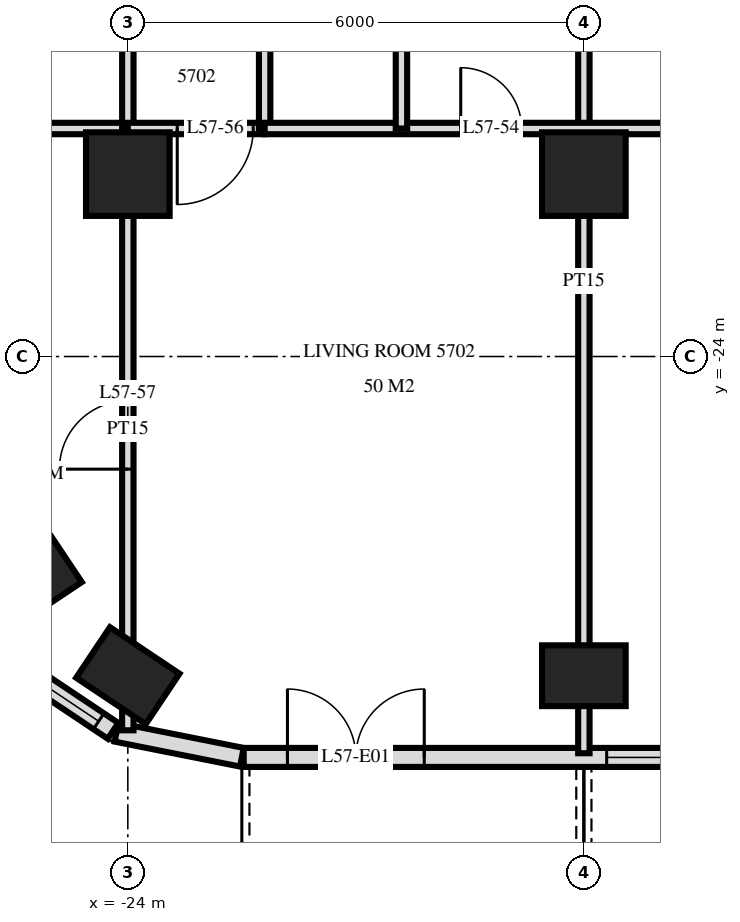
"""IFC4 building model, lengths in metres.
Left out: names, types, materials, properties, quantities, classifications, styles, units other than length and angle.
Written with IfcOpenShell. Run it as: python <this file> out.ifc"""

import sys

from ifc_helpers import new_model, si_unit, direction, frame, frame_2d, origin, origin_2d, place, context, subcontext, project, spatial, rectangle, extrude, element, fill, save


model = new_model("IFC4")
c1 = context("Model", 3, precision=1e-05, world=origin(), true_north=direction((0.0, 1.0)))
c2 = subcontext(c1, "Body", "Model", "MODEL_VIEW")
j1 = project(units=[si_unit("LENGTHUNIT", "METRE"), si_unit("PLANEANGLEUNIT", "RADIAN")], contexts=[c1])
p1 = place(None, origin())
s1 = spatial("IfcSite", under=j1, at=p1, CompositionType="ELEMENT")
p2 = place(p1, origin())
s2 = spatial("IfcBuilding", under=s1, at=p2, CompositionType="ELEMENT")
p3 = place(p2, frame((0.0, 0.0, 218.6)))
s3 = spatial("IfcBuildingStorey", under=s2, at=p3, CompositionType="ELEMENT", Elevation=218.6)
for number, where, z_axis, x_axis in (
    (1, (-25.244, -26.733, 0.0), (0.0, 0.0, 1.0), (-0.556, 0.831, 0.0)),
    (2, (-24.0, -28.2, 0.0), (0.0, 0.0, 1.0), (-0.831, 0.556, 0.0)),
):
    element("IfcColumn", number, at=place(p3, frame(where, z_axis=z_axis, x_axis=x_axis)), inside=s3, PredefinedType="COLUMN", context=c2, shape_type="SweptSolid", body=[
        extrude(rectangle(XDim=1.1, YDim=0.8, at=origin_2d()), origin(), (0.0, 0.0, 1.0), 3.5),
    ])
p4 = place(p3, frame((-24.0, -21.6, 0.0), z_axis=(0.0, 0.0, 1.0), x_axis=(1.0, 0.0, 0.0)))
e3 = element("IfcColumn", 3, at=p4, inside=s3, PredefinedType="COLUMN", context=c2, shape_type="SweptSolid", body=[
    extrude(rectangle(XDim=1.1, YDim=1.1, at=origin_2d()), origin(), (0.0, 0.0, 1.0), 3.5),
])
p5 = place(p3, frame((-18.0, -28.2, 0.0), z_axis=(0.0, 0.0, 1.0), x_axis=(1.0, 0.0, 0.0)))
e4 = element("IfcColumn", 4, at=p5, inside=s3, PredefinedType="COLUMN", context=c2, shape_type="SweptSolid", body=[
    extrude(rectangle(XDim=1.1, YDim=0.8, at=origin_2d()), origin(), (0.0, 0.0, 1.0), 3.5),
])
p6 = place(p3, frame((-18.0, -21.6, 0.0), z_axis=(0.0, 0.0, 1.0), x_axis=(1.0, 0.0, 0.0)))
e5 = element("IfcColumn", 5, at=p6, inside=s3, PredefinedType="COLUMN", context=c2, shape_type="SweptSolid", body=[
    extrude(rectangle(XDim=1.1, YDim=1.1, at=origin_2d()), origin(), (0.0, 0.0, 1.0), 3.5),
])
p7 = place(p3, frame((-25.571, -28.006, 0.0), z_axis=(0.0, 0.0, 1.0), x_axis=(0.831482937015, -0.55555029066, 0.0)))
e6 = element("IfcWall", 6, at=p7, inside=s3, PredefinedType="SOLIDWALL", context=c2, shape_type="SweptSolid", body=[
    extrude(rectangle(XDim=1.656, YDim=0.25, at=frame_2d((0.828, 0.0))), origin(), (0.0, 0.0, 1.0), 3.22),
])
p8 = place(p7, frame((0.228, 0.0, 0.9)))
e7 = element("IfcOpeningElement", 7, at=p8, cuts=e6, PredefinedType="OPENING", context=c2, shape_type="SweptSolid", body=[
    extrude(rectangle(XDim=1.2, YDim=1.5, at=frame_2d((0.6, 0.75))), frame((0.0, 0.135, 0.0), z_axis=(0.0, -1.0, 0.0), x_axis=(1.0, 0.0, 0.0)), (0.0, 0.0, 1.0), 0.27),
])
p9 = place(p3, frame((-24.149, -28.945, 0.0), z_axis=(0.0, 0.0, 1.0), x_axis=(0.980775640221, -0.19513878023, 0.0)))
e8 = element("IfcWall", 8, at=p9, inside=s3, PredefinedType="SOLIDWALL", context=c2, shape_type="SweptSolid", body=[
    extrude(rectangle(XDim=1.681, YDim=0.25, at=frame_2d((0.841, 0.0))), origin(), (0.0, 0.0, 1.0), 3.22),
])
p10 = place(p3, frame((-22.475, -29.275, 0.0), z_axis=(0.0, 0.0, 1.0), x_axis=(1.0, 0.0, 0.0)))
e9 = element("IfcWall", 9, at=p10, inside=s3, PredefinedType="SOLIDWALL", context=c2, shape_type="SweptSolid", body=[
    extrude(rectangle(XDim=44.951, YDim=0.25, at=frame_2d((22.475, 0.0))), origin(), (0.0, 0.0, 1.0), 3.22),
])
p11 = place(p10, frame((0.575, 0.0, 0.0)))
e10 = element("IfcOpeningElement", 10, at=p11, cuts=e9, PredefinedType="OPENING", context=c2, shape_type="SweptSolid", body=[
    extrude(rectangle(XDim=1.8, YDim=2.4, at=frame_2d((0.9, 1.2))), frame((0.0, 0.135, 0.0), z_axis=(0.0, -1.0, 0.0), x_axis=(1.0, 0.0, 0.0)), (0.0, 0.0, 1.0), 0.27),
])
p12 = place(p10, frame((4.775, 0.0, 0.9)))
e11 = element("IfcOpeningElement", 11, at=p12, cuts=e9, PredefinedType="OPENING", context=c2, shape_type="SweptSolid", body=[
    extrude(rectangle(XDim=2.4, YDim=1.5, at=frame_2d((1.2, 0.75))), frame((0.0, 0.135, 0.0), z_axis=(0.0, -1.0, 0.0), x_axis=(1.0, 0.0, 0.0)), (0.0, 0.0, 1.0), 0.27),
])
p13 = place(p10, frame((8.075, 0.0, 0.0)))
e12 = element("IfcOpeningElement", 12, at=p13, cuts=e9, PredefinedType="OPENING", context=c2, shape_type="SweptSolid", body=[
    extrude(rectangle(XDim=1.8, YDim=2.4, at=frame_2d((0.9, 1.2))), frame((0.0, 0.135, 0.0), z_axis=(0.0, -1.0, 0.0), x_axis=(1.0, 0.0, 0.0)), (0.0, 0.0, 1.0), 0.27),
])
p14 = place(p10, frame((11.075, 0.0, 0.0)))
e13 = element("IfcOpeningElement", 13, at=p14, cuts=e9, PredefinedType="OPENING", context=c2, shape_type="SweptSolid", body=[
    extrude(rectangle(XDim=1.8, YDim=2.4, at=frame_2d((0.9, 1.2))), frame((0.0, 0.135, 0.0), z_axis=(0.0, -1.0, 0.0), x_axis=(1.0, 0.0, 0.0)), (0.0, 0.0, 1.0), 0.27),
])
p15 = place(p10, frame((13.775, 0.0, 0.9)))
e14 = element("IfcOpeningElement", 14, at=p15, cuts=e9, PredefinedType="OPENING", context=c2, shape_type="SweptSolid", body=[
    extrude(rectangle(XDim=2.4, YDim=1.5, at=frame_2d((1.2, 0.75))), frame((0.0, 0.135, 0.0), z_axis=(0.0, -1.0, 0.0), x_axis=(1.0, 0.0, 0.0)), (0.0, 0.0, 1.0), 0.27),
])
p16 = place(p10, frame((16.775, 0.0, 0.9)))
e15 = element("IfcOpeningElement", 15, at=p16, cuts=e9, PredefinedType="OPENING", context=c2, shape_type="SweptSolid", body=[
    extrude(rectangle(XDim=2.4, YDim=1.5, at=frame_2d((1.2, 0.75))), frame((0.0, 0.135, 0.0), z_axis=(0.0, -1.0, 0.0), x_axis=(1.0, 0.0, 0.0)), (0.0, 0.0, 1.0), 0.27),
])
p17 = place(p10, frame((20.075, 0.0, 0.0)))
e16 = element("IfcOpeningElement", 16, at=p17, cuts=e9, PredefinedType="OPENING", context=c2, shape_type="SweptSolid", body=[
    extrude(rectangle(XDim=1.8, YDim=2.4, at=frame_2d((0.9, 1.2))), frame((0.0, 0.135, 0.0), z_axis=(0.0, -1.0, 0.0), x_axis=(1.0, 0.0, 0.0)), (0.0, 0.0, 1.0), 0.27),
])
p18 = place(p10, frame((23.075, 0.0, 0.0)))
e17 = element("IfcOpeningElement", 17, at=p18, cuts=e9, PredefinedType="OPENING", context=c2, shape_type="SweptSolid", body=[
    extrude(rectangle(XDim=1.8, YDim=2.4, at=frame_2d((0.9, 1.2))), frame((0.0, 0.135, 0.0), z_axis=(0.0, -1.0, 0.0), x_axis=(1.0, 0.0, 0.0)), (0.0, 0.0, 1.0), 0.27),
])
p19 = place(p10, frame((25.775, 0.0, 0.9)))
e18 = element("IfcOpeningElement", 18, at=p19, cuts=e9, PredefinedType="OPENING", context=c2, shape_type="SweptSolid", body=[
    extrude(rectangle(XDim=2.4, YDim=1.5, at=frame_2d((1.2, 0.75))), frame((0.0, 0.135, 0.0), z_axis=(0.0, -1.0, 0.0), x_axis=(1.0, 0.0, 0.0)), (0.0, 0.0, 1.0), 0.27),
])
p20 = place(p10, frame((29.075, 0.0, 0.0)))
e19 = element("IfcOpeningElement", 19, at=p20, cuts=e9, PredefinedType="OPENING", context=c2, shape_type="SweptSolid", body=[
    extrude(rectangle(XDim=1.8, YDim=2.4, at=frame_2d((0.9, 1.2))), frame((0.0, 0.135, 0.0), z_axis=(0.0, -1.0, 0.0), x_axis=(1.0, 0.0, 0.0)), (0.0, 0.0, 1.0), 0.27),
])
p21 = place(p10, frame((31.775, 0.0, 0.9)))
e20 = element("IfcOpeningElement", 20, at=p21, cuts=e9, PredefinedType="OPENING", context=c2, shape_type="SweptSolid", body=[
    extrude(rectangle(XDim=2.4, YDim=1.5, at=frame_2d((1.2, 0.75))), frame((0.0, 0.135, 0.0), z_axis=(0.0, -1.0, 0.0), x_axis=(1.0, 0.0, 0.0)), (0.0, 0.0, 1.0), 0.27),
])
p22 = place(p10, frame((35.075, 0.0, 0.0)))
e21 = element("IfcOpeningElement", 21, at=p22, cuts=e9, PredefinedType="OPENING", context=c2, shape_type="SweptSolid", body=[
    extrude(rectangle(XDim=1.8, YDim=2.4, at=frame_2d((0.9, 1.2))), frame((0.0, 0.135, 0.0), z_axis=(0.0, -1.0, 0.0), x_axis=(1.0, 0.0, 0.0)), (0.0, 0.0, 1.0), 0.27),
])
p23 = place(p10, frame((41.075, 0.0, 0.0)))
e22 = element("IfcOpeningElement", 22, at=p23, cuts=e9, PredefinedType="OPENING", context=c2, shape_type="SweptSolid", body=[
    extrude(rectangle(XDim=1.8, YDim=2.4, at=frame_2d((0.9, 1.2))), frame((0.0, 0.135, 0.0), z_axis=(0.0, -1.0, 0.0), x_axis=(1.0, 0.0, 0.0)), (0.0, 0.0, 1.0), 0.27),
])
p24 = place(p3, frame((-18.0, -29.22, 0.0), z_axis=(0.0, 0.0, 1.0), x_axis=(0.0, 1.0, 0.0)))
e23 = element("IfcWall", 23, at=p24, inside=s3, PredefinedType="PARTITIONING", context=c2, shape_type="SweptSolid", body=[
    extrude(rectangle(XDim=12.42, YDim=0.15, at=frame_2d((6.21, 0.0))), origin(), (0.0, 0.0, 1.0), 3.22),
])
for number, where, z_axis, x_axis in (
    (24, (-20.4, -21.0, 0.0), (0.0, 0.0, 1.0), (0.0, 1.0, 0.0)),
    (25, (-22.2, -21.0, 0.0), (0.0, 0.0, 1.0), (0.0, 1.0, 0.0)),
):
    element("IfcWall", number, at=place(p3, frame(where, z_axis=z_axis, x_axis=x_axis)), inside=s3, PredefinedType="PARTITIONING", context=c2, shape_type="SweptSolid", body=[
        extrude(rectangle(XDim=4.2, YDim=0.15, at=frame_2d((2.1, 0.0))), origin(), (0.0, 0.0, 1.0), 3.22),
    ])
p25 = place(p3, frame((-24.0, -21.0, 0.0), z_axis=(0.0, 0.0, 1.0), x_axis=(0.0, 1.0, 0.0)))
e26 = element("IfcWall", 26, at=p25, inside=s3, PredefinedType="PARTITIONING", context=c2, shape_type="SweptSolid", body=[
    extrude(rectangle(XDim=4.2, YDim=0.15, at=frame_2d((2.1, 0.0))), origin(), (0.0, 0.0, 1.0), 3.22),
])
p26 = place(p25, frame((1.58, 0.0, 0.0)))
e27 = element("IfcOpeningElement", 27, at=p26, cuts=e26, PredefinedType="OPENING", context=c2, shape_type="SweptSolid", body=[
    extrude(rectangle(XDim=1.0, YDim=2.1, at=frame_2d((0.5, 1.05))), frame((0.0, 0.085, 0.0), z_axis=(0.0, -1.0, 0.0), x_axis=(1.0, 0.0, 0.0)), (0.0, 0.0, 1.0), 0.17),
])
p27 = place(p3, frame((-24.0, -28.918, 0.0), z_axis=(0.0, 0.0, 1.0), x_axis=(0.0, 1.0, 0.0)))
e28 = element("IfcWall", 28, at=p27, inside=s3, PredefinedType="PARTITIONING", context=c2, shape_type="SweptSolid", body=[
    extrude(rectangle(XDim=7.918, YDim=0.15, at=frame_2d((3.959, 0.0))), origin(), (0.0, 0.0, 1.0), 3.22),
])
p28 = place(p27, frame((3.436, 0.0, 0.0)))
e29 = element("IfcOpeningElement", 29, at=p28, cuts=e28, PredefinedType="OPENING", context=c2, shape_type="SweptSolid", body=[
    extrude(rectangle(XDim=0.9, YDim=2.1, at=frame_2d((0.45, 1.05))), frame((0.0, 0.085, 0.0), z_axis=(0.0, -1.0, 0.0), x_axis=(1.0, 0.0, 0.0)), (0.0, 0.0, 1.0), 0.17),
])
p29 = place(p3, frame((-24.0, -21.0, 0.0), z_axis=(0.0, 0.0, 1.0), x_axis=(1.0, 0.0, 0.0)))
e30 = element("IfcWall", 30, at=p29, inside=s3, PredefinedType="PARTITIONING", context=c2, shape_type="SweptSolid", body=[
    extrude(rectangle(XDim=1.8, YDim=0.15, at=frame_2d((0.9, 0.0))), origin(), (0.0, 0.0, 1.0), 3.22),
])
p30 = place(p29, frame((0.65, 0.0, 0.0)))
e31 = element("IfcOpeningElement", 31, at=p30, cuts=e30, PredefinedType="OPENING", context=c2, shape_type="SweptSolid", body=[
    extrude(rectangle(XDim=1.0, YDim=2.1, at=frame_2d((0.5, 1.05))), frame((0.0, 0.085, 0.0), z_axis=(0.0, -1.0, 0.0), x_axis=(1.0, 0.0, 0.0)), (0.0, 0.0, 1.0), 0.17),
])
p31 = place(p3, frame((-26.82, -21.0, 0.0), z_axis=(0.0, 0.0, 1.0), x_axis=(1.0, 0.0, 0.0)))
e32 = element("IfcWall", 32, at=p31, inside=s3, PredefinedType="PARTITIONING", context=c2, shape_type="SweptSolid", body=[
    extrude(rectangle(XDim=2.82, YDim=0.15, at=frame_2d((1.41, 0.0))), origin(), (0.0, 0.0, 1.0), 3.22),
])
p32 = place(p3, frame((-22.2, -21.0, 0.0), z_axis=(0.0, 0.0, 1.0), x_axis=(1.0, 0.0, 0.0)))
e33 = element("IfcWall", 33, at=p32, inside=s3, PredefinedType="PARTITIONING", context=c2, shape_type="SweptSolid", body=[
    extrude(rectangle(XDim=6.3, YDim=0.15, at=frame_2d((3.15, 0.0))), origin(), (0.0, 0.0, 1.0), 3.22),
])
p33 = place(p32, frame((2.58, 0.0, 0.0)))
e34 = element("IfcOpeningElement", 34, at=p33, cuts=e33, PredefinedType="OPENING", context=c2, shape_type="SweptSolid", body=[
    extrude(rectangle(XDim=0.8, YDim=2.1, at=frame_2d((0.4, 1.05))), frame((0.0, 0.085, 0.0), z_axis=(0.0, -1.0, 0.0), x_axis=(1.0, 0.0, 0.0)), (0.0, 0.0, 1.0), 0.17),
])
p34 = place(p8, origin())
e35 = element("IfcWindow", 35, at=p34, inside=s3, PartitioningType="SINGLE_PANEL", PredefinedType="WINDOW", context=c2, shape_type="SweptSolid", body=[
    extrude(rectangle(XDim=1.2, YDim=1.5, at=frame_2d((0.6, 0.75))), frame((0.0, 0.03, 0.0), z_axis=(0.0, -1.0, 0.0), x_axis=(1.0, 0.0, 0.0)), (0.0, 0.0, 1.0), 0.06),
])
fill(e7, e35)
p35 = place(p11, origin())
e36 = element("IfcDoor", 36, at=p35, inside=s3, OperationType="DOUBLE_DOOR_SINGLE_SWING", PredefinedType="DOOR", context=c2, shape_type="SweptSolid", body=[
    extrude(rectangle(XDim=1.8, YDim=2.4, at=frame_2d((0.9, 1.2))), frame((0.0, 0.025, 0.0), z_axis=(0.0, -1.0, 0.0), x_axis=(1.0, 0.0, 0.0)), (0.0, 0.0, 1.0), 0.05),
])
fill(e10, e36)
p36 = place(p12, origin())
e37 = element("IfcWindow", 37, at=p36, inside=s3, PartitioningType="SINGLE_PANEL", PredefinedType="WINDOW", context=c2, shape_type="SweptSolid", body=[
    extrude(rectangle(XDim=2.4, YDim=1.5, at=frame_2d((1.2, 0.75))), frame((0.0, 0.03, 0.0), z_axis=(0.0, -1.0, 0.0), x_axis=(1.0, 0.0, 0.0)), (0.0, 0.0, 1.0), 0.06),
])
fill(e11, e37)
p37 = place(p33, origin())
e38 = element("IfcDoor", 38, at=p37, inside=s3, OperationType="SINGLE_SWING_RIGHT", PredefinedType="DOOR", context=c2, shape_type="SweptSolid", body=[
    extrude(rectangle(XDim=0.8, YDim=2.1, at=frame_2d((0.4, 1.05))), frame((0.0, 0.025, 0.0), z_axis=(0.0, -1.0, 0.0), x_axis=(1.0, 0.0, 0.0)), (0.0, 0.0, 1.0), 0.05),
])
fill(e34, e38)
p38 = place(p30, frame((0.5, 0.0, 0.0), z_axis=(0.0, 0.0, 1.0), x_axis=(-1.0, 0.0, 0.0)))
e39 = element("IfcDoor", 39, at=p38, inside=s3, OperationType="SINGLE_SWING_LEFT", PredefinedType="DOOR", context=c2, shape_type="SweptSolid", body=[
    extrude(rectangle(XDim=1.0, YDim=2.1, at=frame_2d((0.0, 1.05))), frame((0.0, -0.025, 0.0), z_axis=(0.0, 1.0, 0.0), x_axis=(-1.0, 0.0, 0.0)), (0.0, 0.0, 1.0), 0.05),
])
fill(e31, e39)
p39 = place(p28, origin())
e40 = element("IfcDoor", 40, at=p39, inside=s3, OperationType="SINGLE_SWING_RIGHT", PredefinedType="DOOR", context=c2, shape_type="SweptSolid", body=[
    extrude(rectangle(XDim=0.9, YDim=2.1, at=frame_2d((0.45, 1.05))), frame((0.0, 0.025, 0.0), z_axis=(0.0, -1.0, 0.0), x_axis=(1.0, 0.0, 0.0)), (0.0, 0.0, 1.0), 0.05),
])
fill(e29, e40)
save(model, sys.argv[1])
